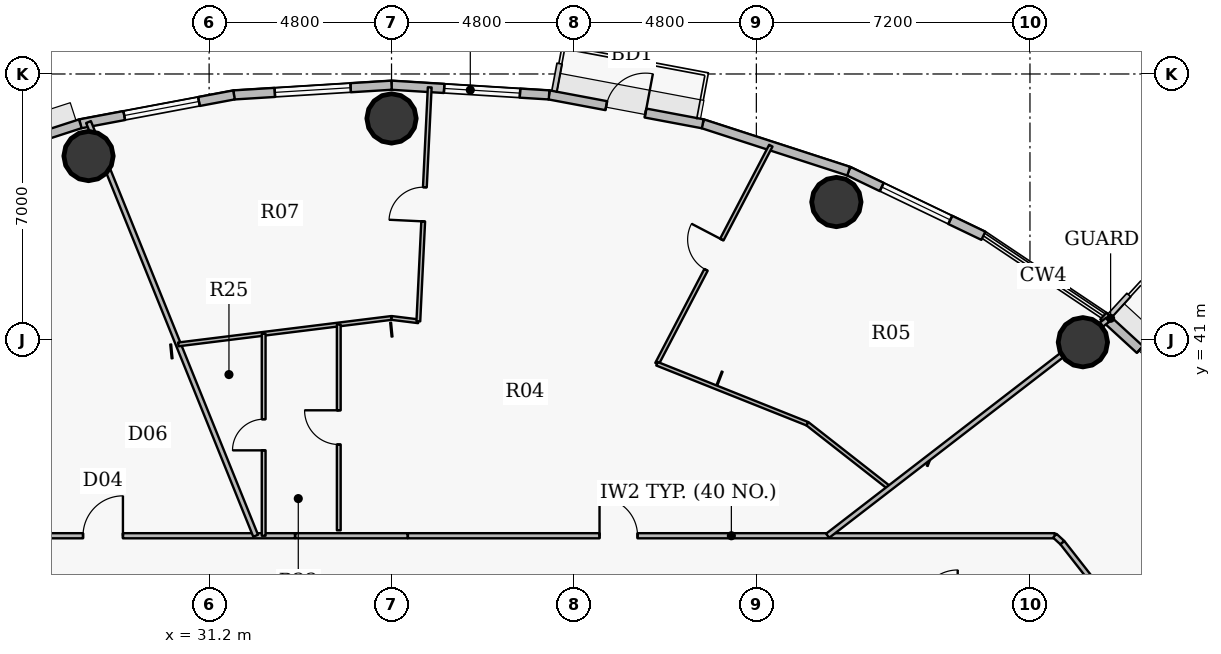
"""IFC4 building model, lengths in metres.
Left out: names, types, materials, properties, quantities, classifications, styles, units other than length and angle.
Written with IfcOpenShell. Run it as: python <this file> out.ifc"""

import sys

from ifc_helpers import new_model, si_unit, direction, frame, frame_2d, origin, origin_2d, place, context, subcontext, project, spatial, rectangle, hollow_circle, extrude, source, transform, mapped, element, fill, save


model = new_model("IFC4")
c1 = context("Model", 3, precision=1e-05, world=origin(), true_north=direction((0.0, 1.0)))
c2 = subcontext(c1, "Body", "Model", "MODEL_VIEW")
j1 = project(units=[si_unit("LENGTHUNIT", "METRE"), si_unit("PLANEANGLEUNIT", "RADIAN")], contexts=[c1])
p1 = place(None, origin())
s1 = spatial("IfcSite", under=j1, at=p1, CompositionType="ELEMENT")
p2 = place(p1, origin())
s2 = spatial("IfcBuilding", under=s1, at=p2, CompositionType="ELEMENT")
p3 = place(p2, frame((0.0, 0.0, 189.9)))
s3 = spatial("IfcBuildingStorey", under=s2, at=p3, CompositionType="ELEMENT", Elevation=189.9)
for number, where, z_axis, x_axis in (
    (1, (54.192, 40.942, 0.0), (0.0, 0.0, 1.0), (1.0, 0.0, 0.0)),
    (2, (47.706, 44.631, 0.0), (0.0, 0.0, 1.0), (1.0, 0.0, 0.0)),
    (3, (36.0, 46.83, 0.0), (0.0, 0.0, 1.0), (1.0, 0.0, 0.0)),
    (4, (28.027, 45.841, 0.0), (0.0, 0.0, 1.0), (1.0, 0.0, 0.0)),
):
    element("IfcColumn", number, at=place(p3, frame(where, z_axis=z_axis, x_axis=x_axis)), inside=s3, PredefinedType="COLUMN", context=c2, shape_type="SweptSolid", body=[
        extrude(hollow_circle(Radius=0.65, WallThickness=0.04, at=origin_2d()), origin(), (0.0, 0.0, 1.0), 3.75),
    ])
p4 = place(p3, frame((54.732, 41.631, 0.0), z_axis=(0.0, 0.0, 1.0), x_axis=(0.737076565834, -0.675809245349, 0.0)))
e5 = element("IfcWall", 5, at=p4, inside=s3, PredefinedType="SOLIDWALL", context=c2, shape_type="SweptSolid", body=[
    extrude(rectangle(XDim=3.658, YDim=0.24, at=frame_2d((1.829, 0.0))), origin(), (0.0, 0.0, 1.0), 3.5),
])
p5 = place(p4, frame((1.304, 0.0, 0.0)))
e6 = element("IfcOpeningElement", 6, at=p5, cuts=e5, PredefinedType="OPENING", context=c2, shape_type="SweptSolid", body=[
    extrude(rectangle(XDim=1.05, YDim=2.15, at=origin_2d()), frame((0.525, 0.13, 1.075), z_axis=(0.0, -1.0, 0.0), x_axis=(1.0, 0.0, 0.0)), (0.0, 0.0, 1.0), 0.26),
])
p6 = place(p3, frame((48.03, 45.444, 0.0), z_axis=(0.0, 0.0, 1.0), x_axis=(0.901564733809, -0.432644231155, 0.0)))
e7 = element("IfcWall", 7, at=p6, inside=s3, PredefinedType="SOLIDWALL", context=c2, shape_type="SweptSolid", body=[
    extrude(rectangle(XDim=3.93, YDim=0.24, at=frame_2d((1.965, 0.0))), origin(), (0.0, 0.0, 1.0), 3.5),
])
p7 = place(p6, frame((0.965, 0.0, 0.9)))
e8 = element("IfcOpeningElement", 8, at=p7, cuts=e7, PredefinedType="OPENING", context=c2, shape_type="SweptSolid", body=[
    extrude(rectangle(XDim=2.0, YDim=1.75, at=origin_2d()), frame((1.0, 0.13, 0.875), z_axis=(0.0, -1.0, 0.0), x_axis=(1.0, 0.0, 0.0)), (0.0, 0.0, 1.0), 0.26),
])
p8 = place(p3, frame((44.189, 46.689, 0.0), z_axis=(0.0, 0.0, 1.0), x_axis=(0.951209870236, -0.30854462038, 0.0)))
e9 = element("IfcWall", 9, at=p8, inside=s3, PredefinedType="SOLIDWALL", context=c2, shape_type="SweptSolid", body=[
    extrude(rectangle(XDim=4.038, YDim=0.24, at=frame_2d((2.019, 0.0))), origin(), (0.0, 0.0, 1.0), 3.5),
])
p9 = place(p3, frame((40.146, 47.449, 0.0), z_axis=(0.0, 0.0, 1.0), x_axis=(0.982788108205, -0.184736391573, 0.0)))
e10 = element("IfcWall", 10, at=p9, inside=s3, PredefinedType="SOLIDWALL", context=c2, shape_type="SweptSolid", body=[
    extrude(rectangle(XDim=4.114, YDim=0.24, at=frame_2d((2.057, 0.0))), origin(), (0.0, 0.0, 1.0), 3.5),
])
p10 = place(p9, frame((1.532, 0.0, 0.0)))
e11 = element("IfcOpeningElement", 11, at=p10, cuts=e10, PredefinedType="OPENING", context=c2, shape_type="SweptSolid", body=[
    extrude(rectangle(XDim=1.05, YDim=2.15, at=origin_2d()), frame((0.525, 0.13, 1.075), z_axis=(0.0, -1.0, 0.0), x_axis=(1.0, 0.0, 0.0)), (0.0, 0.0, 1.0), 0.26),
])
p11 = place(p3, frame((36.0, 47.705, 0.0), z_axis=(0.0, 0.0, 1.0), x_axis=(0.998104600619, -0.061540281305, 0.0)))
e12 = element("IfcWall", 12, at=p11, inside=s3, PredefinedType="SOLIDWALL", context=c2, shape_type="SweptSolid", body=[
    extrude(rectangle(XDim=4.154, YDim=0.24, at=frame_2d((2.077, 0.0))), origin(), (0.0, 0.0, 1.0), 3.5),
])
p12 = place(p11, frame((1.387, 0.0, 0.9)))
e13 = element("IfcOpeningElement", 13, at=p12, cuts=e12, PredefinedType="OPENING", context=c2, shape_type="SweptSolid", body=[
    extrude(rectangle(XDim=2.0, YDim=1.75, at=origin_2d()), frame((1.0, 0.13, 0.875), z_axis=(0.0, -1.0, 0.0), x_axis=(1.0, 0.0, 0.0)), (0.0, 0.0, 1.0), 0.26),
])
p13 = place(p3, frame((31.854, 47.449, 0.0), z_axis=(0.0, 0.0, 1.0), x_axis=(0.998104600619, 0.061540281305, 0.0)))
e14 = element("IfcWall", 14, at=p13, inside=s3, PredefinedType="SOLIDWALL", context=c2, shape_type="SweptSolid", body=[
    extrude(rectangle(XDim=4.154, YDim=0.24, at=frame_2d((2.077, 0.0))), origin(), (0.0, 0.0, 1.0), 3.5),
])
p14 = place(p13, frame((1.077, 0.0, 0.9)))
e15 = element("IfcOpeningElement", 15, at=p14, cuts=e14, PredefinedType="OPENING", context=c2, shape_type="SweptSolid", body=[
    extrude(rectangle(XDim=2.0, YDim=1.75, at=origin_2d()), frame((1.0, 0.13, 0.875), z_axis=(0.0, -1.0, 0.0), x_axis=(1.0, 0.0, 0.0)), (0.0, 0.0, 1.0), 0.26),
])
p15 = place(p3, frame((27.811, 46.689, 0.0), z_axis=(0.0, 0.0, 1.0), x_axis=(0.982788108205, 0.184736391573, 0.0)))
e16 = element("IfcWall", 16, at=p15, inside=s3, PredefinedType="SOLIDWALL", context=c2, shape_type="SweptSolid", body=[
    extrude(rectangle(XDim=4.114, YDim=0.24, at=frame_2d((2.057, 0.0))), origin(), (0.0, 0.0, 1.0), 3.5),
])
p16 = place(p15, frame((1.176, 0.0, 0.9)))
e17 = element("IfcOpeningElement", 17, at=p16, cuts=e16, PredefinedType="OPENING", context=c2, shape_type="SweptSolid", body=[
    extrude(rectangle(XDim=2.0, YDim=1.75, at=origin_2d()), frame((1.0, 0.13, 0.875), z_axis=(0.0, -1.0, 0.0), x_axis=(1.0, 0.0, 0.0)), (0.0, 0.0, 1.0), 0.26),
])
p17 = place(p3, frame((23.97, 45.444, 0.0), z_axis=(0.0, 0.0, 1.0), x_axis=(0.951209870236, 0.30854462038, 0.0)))
e18 = element("IfcWall", 18, at=p17, inside=s3, PredefinedType="SOLIDWALL", context=c2, shape_type="SweptSolid", body=[
    extrude(rectangle(XDim=4.038, YDim=0.24, at=frame_2d((2.019, 0.0))), origin(), (0.0, 0.0, 1.0), 3.5),
])
p18 = place(p17, frame((1.019, 0.0, 0.9)))
e19 = element("IfcOpeningElement", 19, at=p18, cuts=e18, PredefinedType="OPENING", context=c2, shape_type="SweptSolid", body=[
    extrude(rectangle(XDim=2.0, YDim=1.75, at=origin_2d()), frame((1.0, 0.13, 0.875), z_axis=(0.0, -1.0, 0.0), x_axis=(1.0, 0.0, 0.0)), (0.0, 0.0, 1.0), 0.26),
])
p19 = place(p3, frame((24.35, 35.85, 0.0), z_axis=(0.0, 0.0, 1.0), x_axis=(1.0, 0.0, 0.0)))
e20 = element("IfcWall", 20, at=p19, inside=s3, PredefinedType="PARTITIONING", context=c2, shape_type="SweptSolid", body=[
    extrude(rectangle(XDim=9.109, YDim=0.135, at=frame_2d((4.554, 0.0))), origin(), (0.0, 0.0, 1.0), 2.935),
])
p20 = place(p19, frame((3.532, 0.0, 0.0)))
e21 = element("IfcOpeningElement", 21, at=p20, cuts=e20, PredefinedType="OPENING", context=c2, shape_type="SweptSolid", body=[
    extrude(rectangle(XDim=1.05, YDim=2.15, at=origin_2d()), frame((0.525, 0.078, 1.075), z_axis=(0.0, -1.0, 0.0), x_axis=(1.0, 0.0, 0.0)), (0.0, 0.0, 1.0), 0.155),
])
p21 = place(p3, frame((28.027, 46.735, 0.0), z_axis=(0.0, 0.0, 1.0), x_axis=(0.374604711709, -0.927184614824, 0.0)))
e22 = element("IfcWall", 22, at=p21, inside=s3, PredefinedType="PARTITIONING", context=c2, shape_type="SweptSolid", body=[
    extrude(rectangle(XDim=11.74, YDim=0.135, at=frame_2d((5.87, 0.0))), origin(), (0.0, 0.0, 1.0), 2.935),
])
p22 = place(p3, frame((30.39, 40.885, 0.0), z_axis=(0.0, 0.0, 1.0), x_axis=(0.992397005414, 0.123077957591, 0.0)))
e23 = element("IfcWall", 23, at=p22, inside=s3, PredefinedType="PARTITIONING", context=c2, shape_type="SweptSolid", body=[
    extrude(rectangle(XDim=5.653, YDim=0.1, at=frame_2d((2.827, 0.0))), origin(), (0.0, 0.0, 1.0), 2.935),
])
p23 = place(p3, frame((32.636, 35.85, 0.0), z_axis=(0.0, 0.0, 1.0), x_axis=(0.0, 1.0, 0.0)))
e24 = element("IfcWall", 24, at=p23, inside=s3, PredefinedType="PARTITIONING", context=c2, shape_type="SweptSolid", body=[
    extrude(rectangle(XDim=5.314, YDim=0.1, at=frame_2d((2.657, 0.0))), origin(), (0.0, 0.0, 1.0), 2.985),
])
p24 = place(p23, frame((2.247, 0.0, 0.0)))
e25 = element("IfcOpeningElement", 25, at=p24, cuts=e24, PredefinedType="OPENING", context=c2, shape_type="SweptSolid", body=[
    extrude(rectangle(XDim=0.82, YDim=2.1, at=origin_2d()), frame((0.41, 0.06, 1.05), z_axis=(0.0, -1.0, 0.0), x_axis=(1.0, 0.0, 0.0)), (0.0, 0.0, 1.0), 0.12),
])
p25 = place(p3, frame((34.612, 35.993, 0.0), z_axis=(0.0, 0.0, 1.0), x_axis=(0.0, 1.0, 0.0)))
e26 = element("IfcWall", 26, at=p25, inside=s3, PredefinedType="PARTITIONING", context=c2, shape_type="SweptSolid", body=[
    extrude(rectangle(XDim=5.416, YDim=0.1, at=frame_2d((2.708, 0.0))), origin(), (0.0, 0.0, 1.0), 2.985),
])
p26 = place(p25, frame((2.258, 0.0, 0.0)))
e27 = element("IfcOpeningElement", 27, at=p26, cuts=e26, PredefinedType="OPENING", context=c2, shape_type="SweptSolid", body=[
    extrude(rectangle(XDim=0.9, YDim=2.1, at=origin_2d()), frame((0.45, 0.06, 1.05), z_axis=(0.0, -1.0, 0.0), x_axis=(1.0, 0.0, 0.0)), (0.0, 0.0, 1.0), 0.12),
])
p27 = place(p3, frame((36.0, 41.581, 0.0), z_axis=(0.0, 0.0, 1.0), x_axis=(0.992372675388, -0.123273975939, 0.0)))
e28 = element("IfcWall", 28, at=p27, inside=s3, PredefinedType="PARTITIONING", context=c2, shape_type="SweptSolid", body=[
    extrude(rectangle(XDim=0.711, YDim=0.1, at=frame_2d((0.355, 0.0))), origin(), (0.0, 0.0, 1.0), 2.935),
])
p28 = place(p3, frame((36.431, 35.85, 0.0), z_axis=(0.0, 0.0, 1.0), x_axis=(1.0, 0.0, 0.0)))
e29 = element("IfcWall", 29, at=p28, inside=s3, PredefinedType="PARTITIONING", context=c2, shape_type="SweptSolid", body=[
    extrude(rectangle(XDim=17.023, YDim=0.135, at=frame_2d((8.511, 0.0))), origin(), (0.0, 0.0, 1.0), 2.935),
])
p29 = place(p28, frame((5.042, 0.0, 0.0)))
e30 = element("IfcOpeningElement", 30, at=p29, cuts=e29, PredefinedType="OPENING", context=c2, shape_type="SweptSolid", body=[
    extrude(rectangle(XDim=1.0, YDim=2.15, at=origin_2d()), frame((0.5, 0.078, 1.075), z_axis=(0.0, -1.0, 0.0), x_axis=(1.0, 0.0, 0.0)), (0.0, 0.0, 1.0), 0.155),
])
p30 = place(p3, frame((36.706, 41.493, 0.0), z_axis=(0.0, 0.0, 1.0), x_axis=(0.04865506791, 0.99881564083, 0.0)))
e31 = element("IfcWall", 31, at=p30, inside=s3, PredefinedType="PARTITIONING", context=c2, shape_type="SweptSolid", body=[
    extrude(rectangle(XDim=6.162, YDim=0.1, at=frame_2d((3.081, 0.0))), origin(), (0.0, 0.0, 1.0), 2.935),
])
p31 = place(p30, frame((2.631, 0.0, 0.0)))
e32 = element("IfcOpeningElement", 32, at=p31, cuts=e31, PredefinedType="OPENING", context=c2, shape_type="SweptSolid", body=[
    extrude(rectangle(XDim=0.9, YDim=2.1, at=origin_2d()), frame((0.45, 0.06, 1.05), z_axis=(0.0, -1.0, 0.0), x_axis=(1.0, 0.0, 0.0)), (0.0, 0.0, 1.0), 0.12),
])
p32 = place(p3, frame((42.985, 40.376, 0.0), z_axis=(0.0, 0.0, 1.0), x_axis=(0.462895979864, 0.886412608116, 0.0)))
e33 = element("IfcWall", 33, at=p32, inside=s3, PredefinedType="PARTITIONING", context=c2, shape_type="SweptSolid", body=[
    extrude(rectangle(XDim=6.472, YDim=0.1, at=frame_2d((3.236, 0.0))), origin(), (0.0, 0.0, 1.0), 2.935),
])
p33 = place(p32, frame((2.786, 0.0, 0.0)))
e34 = element("IfcOpeningElement", 34, at=p33, cuts=e33, PredefinedType="OPENING", context=c2, shape_type="SweptSolid", body=[
    extrude(rectangle(XDim=0.9, YDim=2.1, at=origin_2d()), frame((0.45, 0.06, 1.05), z_axis=(0.0, -1.0, 0.0), x_axis=(1.0, 0.0, 0.0)), (0.0, 0.0, 1.0), 0.12),
])
p34 = place(p3, frame((42.985, 40.376, 0.0), z_axis=(0.0, 0.0, 1.0), x_axis=(0.928808113019, -0.370561046509, 0.0)))
e35 = element("IfcWall", 35, at=p34, inside=s3, PredefinedType="PARTITIONING", context=c2, shape_type="SweptSolid", body=[
    extrude(rectangle(XDim=4.263, YDim=0.1, at=frame_2d((2.131, 0.0))), origin(), (0.0, 0.0, 1.0), 2.935),
])
p35 = place(p3, frame((46.945, 38.796, 0.0), z_axis=(0.0, 0.0, 1.0), x_axis=(0.787296465136, -0.616574631317, 0.0)))
e36 = element("IfcWall", 36, at=p35, inside=s3, PredefinedType="PARTITIONING", context=c2, shape_type="SweptSolid", body=[
    extrude(rectangle(XDim=2.743, YDim=0.1, at=frame_2d((1.372, 0.0))), origin(), (0.0, 0.0, 1.0), 2.935),
])
p36 = place(p3, frame((47.476, 35.85, 0.0), z_axis=(0.0, 0.0, 1.0), x_axis=(0.791888091101, 0.610666235495, 0.0)))
e37 = element("IfcWall", 37, at=p36, inside=s3, PredefinedType="PARTITIONING", context=c2, shape_type="SweptSolid", body=[
    extrude(rectangle(XDim=9.306, YDim=0.135, at=frame_2d((4.653, 0.0))), origin(), (0.0, 0.0, 1.0), 2.935),
])
p37 = place(p3, frame((53.454, 35.85, 0.0), z_axis=(0.0, 0.0, 1.0), x_axis=(0.736667385572, -0.676255249913, 0.0)))
e38 = element("IfcWall", 38, at=p37, inside=s3, PredefinedType="PARTITIONING", context=c2, shape_type="SweptSolid", body=[
    extrude(rectangle(XDim=0.271, YDim=0.135, at=frame_2d((0.135, 0.0))), origin(), (0.0, 0.0, 1.0), 3.5),
])
p38 = place(p3, frame((53.653, 35.667, 0.0), z_axis=(0.0, 0.0, 1.0), x_axis=(0.616302223209, -0.787509726713, 0.0)))
e39 = element("IfcWall", 39, at=p38, inside=s3, PredefinedType="PARTITIONING", context=c2, shape_type="SweptSolid", body=[
    extrude(rectangle(XDim=2.18, YDim=0.135, at=frame_2d((1.09, 0.0))), origin(), (0.0, 0.0, 1.0), 3.5),
])
p39 = place(p3, frame((33.469, 35.85, 0.0), z_axis=(0.0, 0.0, 1.0), x_axis=(1.0, 0.0, 0.0)))
e40 = element("IfcWall", 40, at=p39, inside=s3, PredefinedType="PARTITIONING", context=c2, shape_type="SweptSolid", body=[
    extrude(rectangle(XDim=2.952, YDim=0.135, at=frame_2d((1.476, 0.0))), origin(), (0.0, 0.0, 1.0), 2.935),
])
m1 = source(origin(), c2, "Body", "SweptSolid", [
    extrude(rectangle(XDim=1.05, YDim=2.15, at=origin_2d()), frame((0.525, 0.025, 1.075), z_axis=(0.0, -1.0, 0.0), x_axis=(1.0, 0.0, 0.0)), (0.0, 0.0, 1.0), 0.05),
])
p40 = place(p5, origin())
e41 = element("IfcDoor", 41, at=p40, inside=s3, OperationType="SINGLE_SWING_LEFT", PredefinedType="DOOR", context=c2, shape_type="MappedRepresentation", body=[
    mapped(m1, transform((0.0, 0.0, 0.0), x_axis=(1.0, 0.0, 0.0), y_axis=(0.0, 1.0, 0.0), z_axis=(0.0, 0.0, 1.0), scale=1.0)),
])
fill(e6, e41)
m2 = source(origin(), c2, "Body", "SweptSolid", [
    extrude(rectangle(XDim=2.0, YDim=1.75, at=origin_2d()), frame((1.0, 0.03, 0.875), z_axis=(0.0, -1.0, 0.0), x_axis=(1.0, 0.0, 0.0)), (0.0, 0.0, 1.0), 0.06),
])
p41 = place(p7, origin())
e42 = element("IfcWindow", 42, at=p41, inside=s3, PartitioningType="DOUBLE_PANEL_VERTICAL", PredefinedType="WINDOW", context=c2, shape_type="MappedRepresentation", body=[
    mapped(m2, transform((0.0, 0.0, 0.0), x_axis=(1.0, 0.0, 0.0), y_axis=(0.0, 1.0, 0.0), z_axis=(0.0, 0.0, 1.0), scale=1.0)),
])
fill(e8, e42)
p42 = place(p10, origin())
e43 = element("IfcDoor", 43, at=p42, inside=s3, OperationType="SINGLE_SWING_RIGHT", PredefinedType="DOOR", context=c2, shape_type="MappedRepresentation", body=[
    mapped(m1, transform((0.0, 0.0, 0.0), x_axis=(1.0, 0.0, 0.0), y_axis=(0.0, 1.0, 0.0), z_axis=(0.0, 0.0, 1.0), scale=1.0)),
])
fill(e11, e43)
p43 = place(p12, origin())
e44 = element("IfcWindow", 44, at=p43, inside=s3, PartitioningType="DOUBLE_PANEL_VERTICAL", PredefinedType="WINDOW", context=c2, shape_type="MappedRepresentation", body=[
    mapped(m2, transform((0.0, 0.0, 0.0), x_axis=(1.0, 0.0, 0.0), y_axis=(0.0, 1.0, 0.0), z_axis=(0.0, 0.0, 1.0), scale=1.0)),
])
fill(e13, e44)
p44 = place(p14, origin())
e45 = element("IfcWindow", 45, at=p44, inside=s3, PartitioningType="DOUBLE_PANEL_VERTICAL", PredefinedType="WINDOW", context=c2, shape_type="MappedRepresentation", body=[
    mapped(m2, transform((0.0, 0.0, 0.0), x_axis=(1.0, 0.0, 0.0), y_axis=(0.0, 1.0, 0.0), z_axis=(0.0, 0.0, 1.0), scale=1.0)),
])
fill(e15, e45)
p45 = place(p16, origin())
e46 = element("IfcWindow", 46, at=p45, inside=s3, PartitioningType="DOUBLE_PANEL_VERTICAL", PredefinedType="WINDOW", context=c2, shape_type="MappedRepresentation", body=[
    mapped(m2, transform((0.0, 0.0, 0.0), x_axis=(1.0, 0.0, 0.0), y_axis=(0.0, 1.0, 0.0), z_axis=(0.0, 0.0, 1.0), scale=1.0)),
])
fill(e17, e46)
m3 = source(origin(), c2, "Body", "SweptSolid", [
    extrude(rectangle(XDim=1.0, YDim=2.15, at=origin_2d()), frame((0.5, 0.025, 1.075), z_axis=(0.0, -1.0, 0.0), x_axis=(1.0, 0.0, 0.0)), (0.0, 0.0, 1.0), 0.05),
])
p46 = place(p29, origin())
e47 = element("IfcDoor", 47, at=p46, inside=s3, OperationType="SINGLE_SWING_LEFT", PredefinedType="DOOR", context=c2, shape_type="MappedRepresentation", body=[
    mapped(m3, transform((0.0, 0.0, 0.0), x_axis=(1.0, 0.0, 0.0), y_axis=(0.0, 1.0, 0.0), z_axis=(0.0, 0.0, 1.0), scale=1.0)),
])
fill(e30, e47)
m4 = source(origin(), c2, "Body", "SweptSolid", [
    extrude(rectangle(XDim=0.9, YDim=2.1, at=origin_2d()), frame((0.45, 0.025, 1.05), z_axis=(0.0, -1.0, 0.0), x_axis=(1.0, 0.0, 0.0)), (0.0, 0.0, 1.0), 0.05),
])
p47 = place(p33, origin())
e48 = element("IfcDoor", 48, at=p47, inside=s3, OperationType="SINGLE_SWING_RIGHT", PredefinedType="DOOR", context=c2, shape_type="MappedRepresentation", body=[
    mapped(m4, transform((0.0, 0.0, 0.0), x_axis=(1.0, 0.0, 0.0), y_axis=(0.0, 1.0, 0.0), z_axis=(0.0, 0.0, 1.0), scale=1.0)),
])
fill(e34, e48)
p48 = place(p31, origin())
e49 = element("IfcDoor", 49, at=p48, inside=s3, OperationType="SINGLE_SWING_LEFT", PredefinedType="DOOR", context=c2, shape_type="MappedRepresentation", body=[
    mapped(m4, transform((0.0, 0.0, 0.0), x_axis=(1.0, 0.0, 0.0), y_axis=(0.0, 1.0, 0.0), z_axis=(0.0, 0.0, 1.0), scale=1.0)),
])
fill(e32, e49)
p49 = place(p26, origin())
e50 = element("IfcDoor", 50, at=p49, inside=s3, OperationType="SINGLE_SWING_RIGHT", PredefinedType="DOOR", context=c2, shape_type="MappedRepresentation", body=[
    mapped(m4, transform((0.0, 0.0, 0.0), x_axis=(1.0, 0.0, 0.0), y_axis=(0.0, 1.0, 0.0), z_axis=(0.0, 0.0, 1.0), scale=1.0)),
])
fill(e27, e50)
m5 = source(origin(), c2, "Body", "SweptSolid", [
    extrude(rectangle(XDim=0.82, YDim=2.1, at=origin_2d()), frame((0.41, 0.025, 1.05), z_axis=(0.0, -1.0, 0.0), x_axis=(1.0, 0.0, 0.0)), (0.0, 0.0, 1.0), 0.05),
])
p50 = place(p24, origin())
e51 = element("IfcDoor", 51, at=p50, inside=s3, OperationType="SINGLE_SWING_LEFT", PredefinedType="DOOR", context=c2, shape_type="MappedRepresentation", body=[
    mapped(m5, transform((0.0, 0.0, 0.0), x_axis=(1.0, 0.0, 0.0), y_axis=(0.0, 1.0, 0.0), z_axis=(0.0, 0.0, 1.0), scale=1.0)),
])
fill(e25, e51)
p51 = place(p20, origin())
e52 = element("IfcDoor", 52, at=p51, inside=s3, OperationType="SINGLE_SWING_RIGHT", PredefinedType="DOOR", context=c2, shape_type="MappedRepresentation", body=[
    mapped(m1, transform((0.0, 0.0, 0.0), x_axis=(1.0, 0.0, 0.0), y_axis=(0.0, 1.0, 0.0), z_axis=(0.0, 0.0, 1.0), scale=1.0)),
])
fill(e21, e52)
save(model, sys.argv[1])
